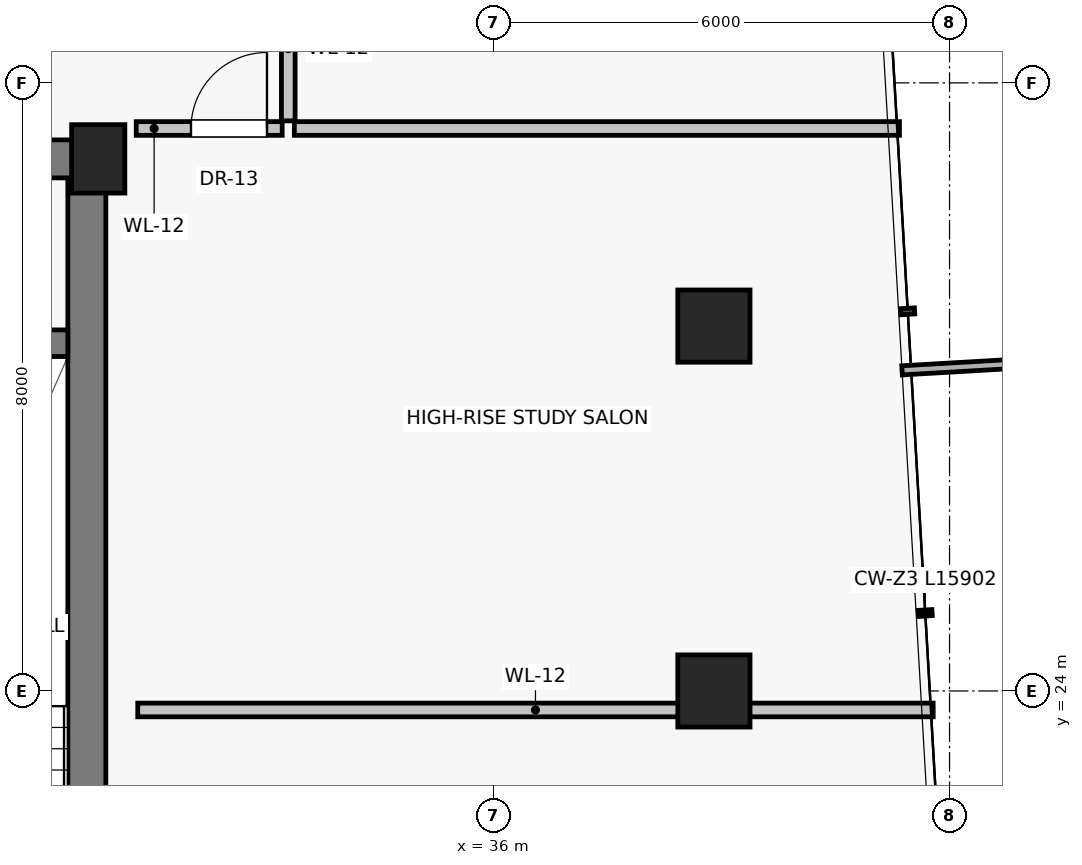
"""IFC4 building model, lengths in metres.
Left out: names, types, materials, properties, quantities, classifications, styles, units other than length and angle.
Written with IfcOpenShell. Run it as: python <this file> out.ifc"""

import sys

from ifc_helpers import new_model, si_unit, direction, frame, frame_2d, origin, origin_2d, place, context, subcontext, project, spatial, rectangle, extrude, source, transform, mapped, element, fill, save


model = new_model("IFC4")
c1 = context("Model", 3, precision=1e-05, world=origin(), true_north=direction((0.0, 1.0)))
c2 = subcontext(c1, "Body", "Model", "MODEL_VIEW")
j1 = project(units=[si_unit("LENGTHUNIT", "METRE"), si_unit("PLANEANGLEUNIT", "RADIAN")], contexts=[c1])
p1 = place(None, origin())
s1 = spatial("IfcSite", under=j1, at=p1, CompositionType="ELEMENT")
p2 = place(p1, origin())
s2 = spatial("IfcBuilding", under=s1, at=p2, CompositionType="ELEMENT")
p3 = place(p2, frame((0.0, 0.0, 195.1)))
s3 = spatial("IfcBuildingStorey", under=s2, at=p3, CompositionType="ELEMENT", Elevation=195.1)
p4 = place(p3, frame((30.8, 31.0, 0.0), z_axis=(0.0, 0.0, 1.0), x_axis=(1.0, 0.0, 0.0)))
e1 = element("IfcColumn", 1, at=p4, inside=s3, PredefinedType="PILASTER", context=c2, shape_type="SweptSolid", body=[
    extrude(rectangle(XDim=0.7, YDim=0.9, at=origin_2d()), origin(), (0.0, 0.0, 1.0), 3.25),
])
for number, where, z_axis, x_axis in (
    (2, (38.9, 24.0, 0.0), (0.0, 0.0, 1.0), (1.0, 0.0, 0.0)),
    (3, (38.9, 28.8, 0.0), (0.0, 0.0, 1.0), (1.0, 0.0, 0.0)),
):
    element("IfcColumn", number, at=place(p3, frame(where, z_axis=z_axis, x_axis=x_axis)), inside=s3, PredefinedType="COLUMN", context=c2, shape_type="SweptSolid", body=[
        extrude(rectangle(XDim=0.95, YDim=0.95, at=origin_2d()), origin(), (0.0, 0.0, 1.0), 3.25),
    ])
p5 = place(p3, frame((30.65, 16.8, 0.0), z_axis=(0.0, 0.0, 1.0), x_axis=(0.0, 1.0, 0.0)))
e4 = element("IfcWall", 4, at=p5, inside=s3, PredefinedType="SHEAR", context=c2, shape_type="SweptSolid", body=[
    extrude(rectangle(XDim=14.2, YDim=0.5, at=frame_2d((7.1, 0.0))), origin(), (0.0, 0.0, 1.0), 3.015),
])
p6 = place(p3, frame((27.0, 31.0, 0.0), z_axis=(0.0, 0.0, 1.0), x_axis=(1.0, 0.0, 0.0)))
e5 = element("IfcWall", 5, at=p6, inside=s3, PredefinedType="SHEAR", context=c2, shape_type="SweptSolid", body=[
    extrude(rectangle(XDim=3.8, YDim=0.5, at=frame_2d((1.9, 0.0))), origin(), (0.0, 0.0, 1.0), 3.015),
])
p7 = place(p6, frame((0.45, 0.0, 0.0)))
e6 = element("IfcOpeningElement", 6, at=p7, cuts=e5, PredefinedType="OPENING", context=c2, shape_type="SweptSolid", body=[
    extrude(rectangle(XDim=0.86, YDim=2.01, at=frame_2d((0.43, 1.005))), frame((0.0, 0.26, 0.0), z_axis=(0.0, -1.0, 0.0), x_axis=(1.0, 0.0, 0.0)), (0.0, 0.0, 1.0), 0.52),
])
p8 = place(p6, frame((1.9, 0.0, 0.0)))
e7 = element("IfcOpeningElement", 7, at=p8, cuts=e5, PredefinedType="OPENING", context=c2, shape_type="SweptSolid", body=[
    extrude(rectangle(XDim=0.86, YDim=2.01, at=frame_2d((0.43, 1.005))), frame((0.0, 0.26, 0.0), z_axis=(0.0, -1.0, 0.0), x_axis=(1.0, 0.0, 0.0)), (0.0, 0.0, 1.0), 0.52),
])
p9 = place(p3, frame((27.025, 28.575, 0.0), z_axis=(0.0, 0.0, 1.0), x_axis=(1.0, 0.0, 0.0)))
e8 = element("IfcWall", 8, at=p9, inside=s3, PredefinedType="SHEAR", context=c2, shape_type="SweptSolid", body=[
    extrude(rectangle(XDim=3.375, YDim=0.35, at=frame_2d((1.688, 0.0))), origin(), (0.0, 0.0, 1.0), 3.015),
])
p10 = place(p3, frame((31.32, 23.75, 0.0), z_axis=(0.0, 0.0, 1.0), x_axis=(1.0, 0.0, 0.0)))
e9 = element("IfcWall", 9, at=p10, inside=s3, PredefinedType="PARTITIONING", context=c2, shape_type="SweptSolid", body=[
    extrude(rectangle(XDim=10.464, YDim=0.18, at=frame_2d((5.232, 0.0))), origin(), (0.0, 0.0, 1.0), 3.015),
])
p11 = place(p3, frame((33.3, 31.5, 0.0), z_axis=(0.0, 0.0, 1.0), x_axis=(0.0, 1.0, 0.0)))
e10 = element("IfcWall", 10, at=p11, inside=s3, PredefinedType="PARTITIONING", context=c2, shape_type="SweptSolid", body=[
    extrude(rectangle(XDim=1.9, YDim=0.18, at=frame_2d((0.95, 0.0))), origin(), (0.0, 0.0, 1.0), 3.015),
])
p12 = place(p3, frame((31.3, 31.4, 0.0), z_axis=(0.0, 0.0, 1.0), x_axis=(1.0, 0.0, 0.0)))
e11 = element("IfcWall", 11, at=p12, inside=s3, PredefinedType="PARTITIONING", context=c2, shape_type="SweptSolid", body=[
    extrude(rectangle(XDim=1.92, YDim=0.18, at=frame_2d((0.96, 0.0))), origin(), (0.0, 0.0, 1.0), 3.015),
])
p13 = place(p12, frame((0.72, 0.0, 0.0)))
e12 = element("IfcOpeningElement", 12, at=p13, cuts=e11, PredefinedType="OPENING", context=c2, shape_type="SweptSolid", body=[
    extrude(rectangle(XDim=1.0, YDim=2.01, at=frame_2d((0.5, 1.005))), frame((0.0, 0.1, 0.0), z_axis=(0.0, -1.0, 0.0), x_axis=(1.0, 0.0, 0.0)), (0.0, 0.0, 1.0), 0.2),
])
p14 = place(p3, frame((33.38, 31.4, 0.0), z_axis=(0.0, 0.0, 1.0), x_axis=(1.0, 0.0, 0.0)))
e13 = element("IfcWall", 13, at=p14, inside=s3, PredefinedType="PARTITIONING", context=c2, shape_type="SweptSolid", body=[
    extrude(rectangle(XDim=7.961, YDim=0.18, at=frame_2d((3.98, 0.0))), origin(), (0.0, 0.0, 1.0), 3.015),
])
m1 = source(origin(), c2, "Body", "SweptSolid", [
    extrude(rectangle(XDim=1.0, YDim=2.01, at=frame_2d((0.5, 1.005))), frame((0.0, 0.025, 0.0), z_axis=(0.0, -1.0, 0.0), x_axis=(1.0, 0.0, 0.0)), (0.0, 0.0, 1.0), 0.05),
])
p15 = place(p13, origin())
e14 = element("IfcDoor", 14, at=p15, inside=s3, OperationType="SINGLE_SWING_RIGHT", PredefinedType="DOOR", context=c2, shape_type="MappedRepresentation", body=[
    mapped(m1, transform((0.0, 0.0, 0.0), scale=1.0)),
])
fill(e12, e14)
save(model, sys.argv[1])
